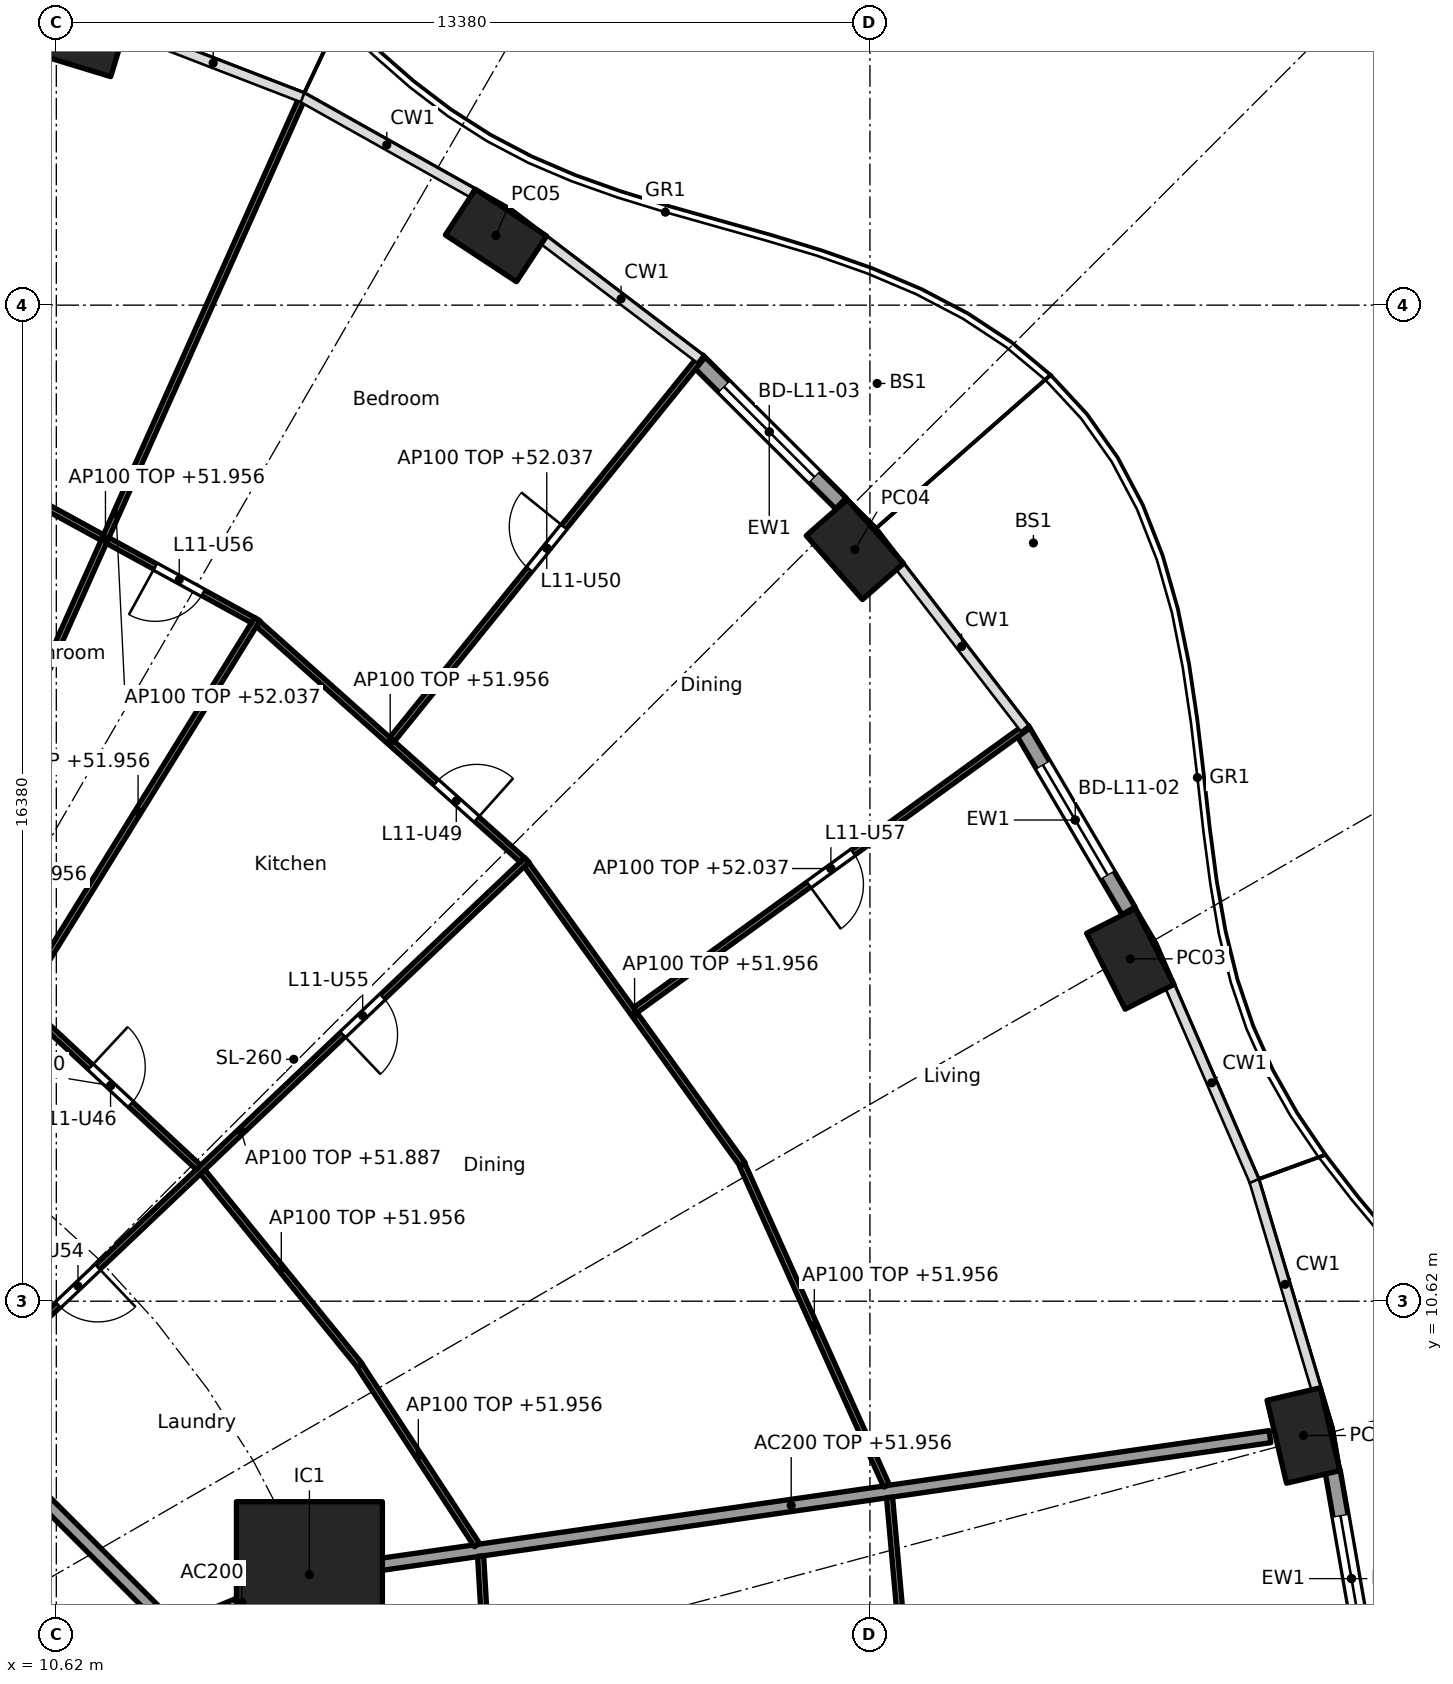
"""IFC4 building model, lengths in metres.
Left out: names, types, materials, properties, quantities, classifications, styles, units other than length and angle.
Written with IfcOpenShell. Run it as: python <this file> out.ifc"""

import sys

from ifc_helpers import new_model, si_unit, direction, frame, frame_2d, origin, origin_2d, place, context, subcontext, project, spatial, rectangle, hollow_rectangle, extrude, element, fill, save


model = new_model("IFC4")
c1 = context("Model", 3, precision=1e-05, world=origin(), true_north=direction((0.0, 1.0)))
c2 = subcontext(c1, "Body", "Model", "MODEL_VIEW")
j1 = project(units=[si_unit("LENGTHUNIT", "METRE"), si_unit("PLANEANGLEUNIT", "RADIAN")], contexts=[c1])
p1 = place(None, origin())
s1 = spatial("IfcSite", under=j1, at=p1, CompositionType="ELEMENT")
p2 = place(p1, origin())
s2 = spatial("IfcBuilding", under=s1, at=p2, CompositionType="ELEMENT")
p3 = place(p2, frame((0.0, 0.0, 49.2)))
s3 = spatial("IfcBuildingStorey", under=s2, at=p3, CompositionType="ELEMENT", Elevation=49.2)
for number, where, z_axis, x_axis in (
    (1, (31.129, 8.412, 0.0), (0.0, 0.0, 1.0), (-0.229, 0.973, 0.0)),
    (2, (28.282, 16.25, 0.0), (0.0, 0.0, 1.0), (-0.452, 0.892, 0.0)),
    (3, (23.752, 22.981, 0.0), (0.0, 0.0, 1.0), (-0.66, 0.751, 0.0)),
    (4, (17.85, 28.146, 0.0), (0.0, 0.0, 1.0), (-0.836, 0.549, 0.0)),
    (5, (10.976, 31.393, 0.0), (0.0, 0.0, 1.0), (-0.957, 0.292, 0.0)),
):
    element("IfcColumn", number, at=place(p3, frame(where, z_axis=z_axis, x_axis=x_axis)), inside=s3, PredefinedType="COLUMN", context=c2, shape_type="SweptSolid", body=[
        extrude(hollow_rectangle(XDim=1.4, YDim=0.9, WallThickness=0.05, at=origin_2d()), origin(), (0.0, 0.0, 1.0), 3.7),
    ])
p4 = place(p3, frame((14.782, 6.123, 0.0), z_axis=(0.0, 0.0, 1.0), x_axis=(1.0, 0.0, 0.0)))
e6 = element("IfcColumn", 6, at=p4, inside=s3, PredefinedType="COLUMN", context=c2, shape_type="SweptSolid", body=[
    extrude(rectangle(XDim=2.4, YDim=2.4, at=origin_2d()), origin(), (0.0, 0.0, 1.0), 3.7),
])
p5 = place(p3, frame((31.609, 7.83, 0.0), z_axis=(0.0, 0.0, 1.0), x_axis=(0.172217377323, -0.98505897029, 0.0)))
e7 = element("IfcWall", 7, at=p5, inside=s3, PredefinedType="SOLIDWALL", context=c2, shape_type="SweptSolid", body=[
    extrude(rectangle(XDim=3.598, YDim=0.25, at=frame_2d((1.799, 0.0))), origin(), (0.0, 0.0, 1.0), 3.44),
])
p6 = place(p5, frame((0.749, 0.0, 0.0)))
e8 = element("IfcOpeningElement", 8, at=p6, cuts=e7, PredefinedType="OPENING", context=c2, shape_type="SweptSolid", body=[
    extrude(rectangle(XDim=2.1, YDim=2.4, at=frame_2d((1.05, 1.2))), frame((0.0, 0.135, 0.0), z_axis=(0.0, -1.0, 0.0), x_axis=(1.0, 0.0, 0.0)), (0.0, 0.0, 1.0), 0.27),
])
p7 = place(p3, frame((26.5, 20.026, 0.0), z_axis=(0.0, 0.0, 1.0), x_axis=(0.506311160839, -0.862350861546, 0.0)))
e9 = element("IfcWall", 9, at=p7, inside=s3, PredefinedType="SOLIDWALL", context=c2, shape_type="SweptSolid", body=[
    extrude(rectangle(XDim=3.462, YDim=0.25, at=frame_2d((1.731, 0.0))), origin(), (0.0, 0.0, 1.0), 3.44),
])
p8 = place(p7, frame((0.681, 0.0, 0.0)))
e10 = element("IfcOpeningElement", 10, at=p8, cuts=e9, PredefinedType="OPENING", context=c2, shape_type="SweptSolid", body=[
    extrude(rectangle(XDim=2.1, YDim=2.4, at=frame_2d((1.05, 1.2))), frame((0.0, 0.135, 0.0), z_axis=(0.0, -1.0, 0.0), x_axis=(1.0, 0.0, 0.0)), (0.0, 0.0, 1.0), 0.27),
])
p9 = place(p3, frame((21.166, 26.092, 0.0), z_axis=(0.0, 0.0, 1.0), x_axis=(0.707803094595, -0.706409781417, 0.0)))
e11 = element("IfcWall", 11, at=p9, inside=s3, PredefinedType="SOLIDWALL", context=c2, shape_type="SweptSolid", body=[
    extrude(rectangle(XDim=3.329, YDim=0.25, at=frame_2d((1.665, 0.0))), origin(), (0.0, 0.0, 1.0), 3.44),
])
p10 = place(p9, frame((0.615, 0.0, 0.0)))
e12 = element("IfcOpeningElement", 12, at=p10, cuts=e11, PredefinedType="OPENING", context=c2, shape_type="SweptSolid", body=[
    extrude(rectangle(XDim=2.1, YDim=2.4, at=frame_2d((1.05, 1.2))), frame((0.0, 0.135, 0.0), z_axis=(0.0, -1.0, 0.0), x_axis=(1.0, 0.0, 0.0)), (0.0, 0.0, 1.0), 0.27),
])
p11 = place(p3, frame((12.657, 5.243, 0.0), z_axis=(0.0, 0.0, 1.0), x_axis=(0.923853160736, 0.382747093259, 0.0)))
e13 = element("IfcWall", 13, at=p11, inside=s3, PredefinedType="PARTITIONING", context=c2, shape_type="SweptSolid", body=[
    extrude(rectangle(XDim=2.2, YDim=0.2, at=frame_2d((1.1, 0.0))), origin(), (0.0, 0.0, 1.0), 3.44),
])
p12 = place(p3, frame((14.832, 6.13, 0.0), z_axis=(0.0, 0.0, 1.0), x_axis=(0.989836541293, 0.142209779978, 0.0)))
e14 = element("IfcWall", 14, at=p12, inside=s3, PredefinedType="PARTITIONING", context=c2, shape_type="SweptSolid", body=[
    extrude(rectangle(XDim=15.909, YDim=0.2, at=frame_2d((7.955, 0.0))), origin(), (0.0, 0.0, 1.0), 2.756),
])
p13 = place(p3, frame((12.635, 5.134, 0.0), z_axis=(0.0, 0.0, 1.0), x_axis=(-0.707106781187, 0.707106781187, 0.0)))
e15 = element("IfcWall", 15, at=p13, inside=s3, PredefinedType="PARTITIONING", context=c2, shape_type="SweptSolid", body=[
    extrude(rectangle(XDim=10.609, YDim=0.2, at=frame_2d((5.305, 0.0))), origin(), (0.0, 0.0, 1.0), 3.44),
])
p14 = place(p3, frame((17.971, 0.05, 0.0), z_axis=(0.0, 0.0, 1.0), x_axis=(-0.058513659907, 0.998286607946, 0.0)))
e16 = element("IfcWall", 16, at=p14, inside=s3, PredefinedType="PARTITIONING", context=c2, shape_type="SweptSolid", body=[
    extrude(rectangle(XDim=6.388, YDim=0.1, at=frame_2d((3.194, 0.0))), origin(), (0.0, 0.0, 1.0), 2.756),
])
p15 = place(p3, frame((24.982, 0.05, 0.0), z_axis=(0.0, 0.0, 1.0), x_axis=(-0.08944290521, 0.995991951126, 0.0)))
e17 = element("IfcWall", 17, at=p15, inside=s3, PredefinedType="PARTITIONING", context=c2, shape_type="SweptSolid", body=[
    extrude(rectangle(XDim=7.373, YDim=0.1, at=frame_2d((3.686, 0.0))), origin(), (0.0, 0.0, 1.0), 2.756),
])
p16 = place(p3, frame((17.537, 6.61, 0.0), z_axis=(0.0, 0.0, 1.0), x_axis=(-0.547637987196, 0.836715384692, 0.0)))
e18 = element("IfcWall", 18, at=p16, inside=s3, PredefinedType="PARTITIONING", context=c2, shape_type="SweptSolid", body=[
    extrude(rectangle(XDim=3.52, YDim=0.1, at=frame_2d((1.76, 0.0))), origin(), (0.0, 0.0, 1.0), 2.756),
])
p17 = place(p3, frame((24.273, 7.584, 0.0), z_axis=(0.0, 0.0, 1.0), x_axis=(-0.410201529109, 0.911994904326, 0.0)))
e19 = element("IfcWall", 19, at=p17, inside=s3, PredefinedType="PARTITIONING", context=c2, shape_type="SweptSolid", body=[
    extrude(rectangle(XDim=5.787, YDim=0.1, at=frame_2d((2.894, 0.0))), origin(), (0.0, 0.0, 1.0), 2.756),
])
p18 = place(p3, frame((15.614, 9.559, 0.0), z_axis=(0.0, 0.0, 1.0), x_axis=(-0.63012473344, 0.776493928056, 0.0)))
e20 = element("IfcWall", 20, at=p18, inside=s3, PredefinedType="PARTITIONING", context=c2, shape_type="SweptSolid", body=[
    extrude(rectangle(XDim=4.106, YDim=0.1, at=frame_2d((2.053, 0.0))), origin(), (0.0, 0.0, 1.0), 2.756),
])
p19 = place(p3, frame((21.908, 12.866, 0.0), z_axis=(0.0, 0.0, 1.0), x_axis=(-0.584558392935, 0.811351640936, 0.0)))
e21 = element("IfcWall", 21, at=p19, inside=s3, PredefinedType="PARTITIONING", context=c2, shape_type="SweptSolid", body=[
    extrude(rectangle(XDim=6.084, YDim=0.1, at=frame_2d((3.042, 0.0))), origin(), (0.0, 0.0, 1.0), 2.756),
])
p20 = place(p3, frame((20.141, 15.405, 0.0), z_axis=(0.0, 0.0, 1.0), x_axis=(0.809834895779, 0.58665785734, 0.0)))
e22 = element("IfcWall", 22, at=p20, inside=s3, PredefinedType="PARTITIONING", context=c2, shape_type="SweptSolid", body=[
    extrude(rectangle(XDim=7.945, YDim=0.1, at=frame_2d((3.973, 0.0))), origin(), (0.0, 0.0, 1.0), 2.837),
])
p21 = place(p20, frame((3.522, 0.0, 0.0)))
e23 = element("IfcOpeningElement", 23, at=p21, cuts=e22, PredefinedType="OPENING", context=c2, shape_type="SweptSolid", body=[
    extrude(rectangle(XDim=0.9, YDim=2.1, at=frame_2d((0.45, 1.05))), frame((0.0, 0.06, 0.0), z_axis=(0.0, -1.0, 0.0), x_axis=(1.0, 0.0, 0.0)), (0.0, 0.0, 1.0), 0.12),
])
p22 = place(p3, frame((8.957, 8.953, 0.0), z_axis=(0.0, 0.0, 1.0), x_axis=(0.725250022034, 0.688485588476, 0.0)))
e24 = element("IfcWall", 24, at=p22, inside=s3, PredefinedType="PARTITIONING", context=c2, shape_type="SweptSolid", body=[
    extrude(rectangle(XDim=12.963, YDim=0.1, at=frame_2d((6.481, 0.0))), origin(), (0.0, 0.0, 1.0), 2.687),
])
p23 = place(p22, frame((2.333, 0.0, 0.0)))
e25 = element("IfcOpeningElement", 25, at=p23, cuts=e24, PredefinedType="OPENING", context=c2, shape_type="SweptSolid", body=[
    extrude(rectangle(XDim=0.9, YDim=2.1, at=frame_2d((0.45, 1.05))), frame((0.0, 0.06, 0.0), z_axis=(0.0, -1.0, 0.0), x_axis=(1.0, 0.0, 0.0)), (0.0, 0.0, 1.0), 0.12),
])
p24 = place(p22, frame((8.79, 0.0, 0.0)))
e26 = element("IfcOpeningElement", 26, at=p24, cuts=e24, PredefinedType="OPENING", context=c2, shape_type="SweptSolid", body=[
    extrude(rectangle(XDim=0.9, YDim=2.1, at=frame_2d((0.45, 1.05))), frame((0.0, 0.06, 0.0), z_axis=(0.0, -1.0, 0.0), x_axis=(1.0, 0.0, 0.0)), (0.0, 0.0, 1.0), 0.12),
])
p25 = place(p3, frame((12.958, 12.82, 0.0), z_axis=(0.0, 0.0, 1.0), x_axis=(-0.732022571638, 0.681280378855, 0.0)))
e27 = element("IfcWall", 27, at=p25, inside=s3, PredefinedType="PARTITIONING", context=c2, shape_type="SweptSolid", body=[
    extrude(rectangle(XDim=3.95, YDim=0.1, at=frame_2d((1.975, 0.0))), origin(), (0.0, 0.0, 1.0), 3.44),
])
p26 = place(p25, frame((1.525, 0.0, 0.0)))
e28 = element("IfcOpeningElement", 28, at=p26, cuts=e27, PredefinedType="OPENING", context=c2, shape_type="SweptSolid", body=[
    extrude(rectangle(XDim=0.9, YDim=2.1, at=frame_2d((0.45, 1.05))), frame((0.0, 0.06, 0.0), z_axis=(0.0, -1.0, 0.0), x_axis=(1.0, 0.0, 0.0)), (0.0, 0.0, 1.0), 0.12),
])
p27 = place(p3, frame((18.285, 17.877, 0.0), z_axis=(0.0, 0.0, 1.0), x_axis=(-0.745806142791, 0.666163041136, 0.0)))
e29 = element("IfcWall", 29, at=p27, inside=s3, PredefinedType="PARTITIONING", context=c2, shape_type="SweptSolid", body=[
    extrude(rectangle(XDim=5.831, YDim=0.1, at=frame_2d((2.915, 0.0))), origin(), (0.0, 0.0, 1.0), 2.756),
])
p28 = place(p27, frame((1.008, 0.0, 0.0)))
e30 = element("IfcOpeningElement", 30, at=p28, cuts=e29, PredefinedType="OPENING", context=c2, shape_type="SweptSolid", body=[
    extrude(rectangle(XDim=0.9, YDim=2.1, at=frame_2d((0.45, 1.05))), frame((0.0, 0.06, 0.0), z_axis=(0.0, -1.0, 0.0), x_axis=(1.0, 0.0, 0.0)), (0.0, 0.0, 1.0), 0.12),
])
p29 = place(p3, frame((16.142, 19.858, 0.0), z_axis=(0.0, 0.0, 1.0), x_axis=(0.628738066508, 0.777617157555, 0.0)))
e31 = element("IfcWall", 31, at=p29, inside=s3, PredefinedType="PARTITIONING", context=c2, shape_type="SweptSolid", body=[
    extrude(rectangle(XDim=8.091, YDim=0.1, at=frame_2d((4.045, 0.0))), origin(), (0.0, 0.0, 1.0), 2.837),
])
p30 = place(p29, frame((3.595, 0.0, 0.0)))
e32 = element("IfcOpeningElement", 32, at=p30, cuts=e31, PredefinedType="OPENING", context=c2, shape_type="SweptSolid", body=[
    extrude(rectangle(XDim=0.9, YDim=2.1, at=frame_2d((0.45, 1.05))), frame((0.0, 0.06, 0.0), z_axis=(0.0, -1.0, 0.0), x_axis=(1.0, 0.0, 0.0)), (0.0, 0.0, 1.0), 0.12),
])
p31 = place(p3, frame((10.003, 15.503, 0.0), z_axis=(0.0, 0.0, 1.0), x_axis=(0.52645953022, 0.850200189979, 0.0)))
e33 = element("IfcWall", 33, at=p31, inside=s3, PredefinedType="PARTITIONING", context=c2, shape_type="SweptSolid", body=[
    extrude(rectangle(XDim=7.45, YDim=0.1, at=frame_2d((3.725, 0.0))), origin(), (0.0, 0.0, 1.0), 2.756),
])
p32 = place(p3, frame((13.855, 21.818, 0.0), z_axis=(0.0, 0.0, 1.0), x_axis=(-0.876794415294, 0.480865421203, 0.0)))
e34 = element("IfcWall", 34, at=p32, inside=s3, PredefinedType="PARTITIONING", context=c2, shape_type="SweptSolid", body=[
    extrude(rectangle(XDim=5.536, YDim=0.1, at=frame_2d((2.768, 0.0))), origin(), (0.0, 0.0, 1.0), 2.756),
])
p33 = place(p32, frame((0.934, 0.0, 0.0)))
e35 = element("IfcOpeningElement", 35, at=p33, cuts=e34, PredefinedType="OPENING", context=c2, shape_type="SweptSolid", body=[
    extrude(rectangle(XDim=0.9, YDim=2.1, at=frame_2d((0.45, 1.05))), frame((0.0, 0.06, 0.0), z_axis=(0.0, -1.0, 0.0), x_axis=(1.0, 0.0, 0.0)), (0.0, 0.0, 1.0), 0.12),
])
p34 = place(p3, frame((8.524, 16.676, 0.0), z_axis=(0.0, 0.0, 1.0), x_axis=(0.408065177262, 0.912952797852, 0.0)))
e36 = element("IfcWall", 36, at=p34, inside=s3, PredefinedType="PARTITIONING", context=c2, shape_type="SweptSolid", body=[
    extrude(rectangle(XDim=15.089, YDim=0.1, at=frame_2d((7.544, 0.0))), origin(), (0.0, 0.0, 1.0), 2.837),
])
p35 = place(p6, origin())
e37 = element("IfcDoor", 37, at=p35, inside=s3, OperationType="SLIDING_TO_LEFT", PredefinedType="DOOR", context=c2, shape_type="SweptSolid", body=[
    extrude(rectangle(XDim=2.1, YDim=2.4, at=frame_2d((1.05, 1.2))), frame((0.0, 0.025, 0.0), z_axis=(0.0, -1.0, 0.0), x_axis=(1.0, 0.0, 0.0)), (0.0, 0.0, 1.0), 0.05),
])
fill(e8, e37)
p36 = place(p8, origin())
e38 = element("IfcDoor", 38, at=p36, inside=s3, OperationType="SLIDING_TO_LEFT", PredefinedType="DOOR", context=c2, shape_type="SweptSolid", body=[
    extrude(rectangle(XDim=2.1, YDim=2.4, at=frame_2d((1.05, 1.2))), frame((0.0, 0.025, 0.0), z_axis=(0.0, -1.0, 0.0), x_axis=(1.0, 0.0, 0.0)), (0.0, 0.0, 1.0), 0.05),
])
fill(e10, e38)
p37 = place(p10, origin())
e39 = element("IfcDoor", 39, at=p37, inside=s3, OperationType="SLIDING_TO_LEFT", PredefinedType="DOOR", context=c2, shape_type="SweptSolid", body=[
    extrude(rectangle(XDim=2.1, YDim=2.4, at=frame_2d((1.05, 1.2))), frame((0.0, 0.025, 0.0), z_axis=(0.0, -1.0, 0.0), x_axis=(1.0, 0.0, 0.0)), (0.0, 0.0, 1.0), 0.05),
])
fill(e12, e39)
p38 = place(p26, frame((0.9, 0.0, 0.0), x_axis=(-1.0, 0.0, 0.0)))
e40 = element("IfcDoor", 40, at=p38, inside=s3, OperationType="SINGLE_SWING_LEFT", PredefinedType="DOOR", context=c2, shape_type="SweptSolid", body=[
    extrude(rectangle(XDim=0.9, YDim=2.1, at=frame_2d((0.45, 1.05))), frame((0.0, 0.025, 0.0), z_axis=(0.0, -1.0, 0.0), x_axis=(1.0, 0.0, 0.0)), (0.0, 0.0, 1.0), 0.05),
])
fill(e28, e40)
p39 = place(p28, frame((0.9, 0.0, 0.0), x_axis=(-1.0, 0.0, 0.0)))
e41 = element("IfcDoor", 41, at=p39, inside=s3, OperationType="SINGLE_SWING_RIGHT", PredefinedType="DOOR", context=c2, shape_type="SweptSolid", body=[
    extrude(rectangle(XDim=0.9, YDim=2.1, at=frame_2d((0.45, 1.05))), frame((0.0, 0.025, 0.0), z_axis=(0.0, -1.0, 0.0), x_axis=(1.0, 0.0, 0.0)), (0.0, 0.0, 1.0), 0.05),
])
fill(e30, e41)
p40 = place(p30, origin())
e42 = element("IfcDoor", 42, at=p40, inside=s3, OperationType="SINGLE_SWING_RIGHT", PredefinedType="DOOR", context=c2, shape_type="SweptSolid", body=[
    extrude(rectangle(XDim=0.9, YDim=2.1, at=frame_2d((0.45, 1.05))), frame((0.0, 0.025, 0.0), z_axis=(0.0, -1.0, 0.0), x_axis=(1.0, 0.0, 0.0)), (0.0, 0.0, 1.0), 0.05),
])
fill(e32, e42)
p41 = place(p23, frame((0.9, 0.0, 0.0), x_axis=(-1.0, 0.0, 0.0)))
e43 = element("IfcDoor", 43, at=p41, inside=s3, OperationType="SINGLE_SWING_LEFT", PredefinedType="DOOR", context=c2, shape_type="SweptSolid", body=[
    extrude(rectangle(XDim=0.9, YDim=2.1, at=frame_2d((0.45, 1.05))), frame((0.0, 0.025, 0.0), z_axis=(0.0, -1.0, 0.0), x_axis=(1.0, 0.0, 0.0)), (0.0, 0.0, 1.0), 0.05),
])
fill(e25, e43)
p42 = place(p24, frame((0.9, 0.0, 0.0), x_axis=(-1.0, 0.0, 0.0)))
e44 = element("IfcDoor", 44, at=p42, inside=s3, OperationType="SINGLE_SWING_RIGHT", PredefinedType="DOOR", context=c2, shape_type="SweptSolid", body=[
    extrude(rectangle(XDim=0.9, YDim=2.1, at=frame_2d((0.45, 1.05))), frame((0.0, 0.025, 0.0), z_axis=(0.0, -1.0, 0.0), x_axis=(1.0, 0.0, 0.0)), (0.0, 0.0, 1.0), 0.05),
])
fill(e26, e44)
p43 = place(p33, origin())
e45 = element("IfcDoor", 45, at=p43, inside=s3, OperationType="SINGLE_SWING_RIGHT", PredefinedType="DOOR", context=c2, shape_type="SweptSolid", body=[
    extrude(rectangle(XDim=0.9, YDim=2.1, at=frame_2d((0.45, 1.05))), frame((0.0, 0.025, 0.0), z_axis=(0.0, -1.0, 0.0), x_axis=(1.0, 0.0, 0.0)), (0.0, 0.0, 1.0), 0.05),
])
fill(e35, e45)
p44 = place(p21, frame((0.9, 0.0, 0.0), x_axis=(-1.0, 0.0, 0.0)))
e46 = element("IfcDoor", 46, at=p44, inside=s3, OperationType="SINGLE_SWING_RIGHT", PredefinedType="DOOR", context=c2, shape_type="SweptSolid", body=[
    extrude(rectangle(XDim=0.9, YDim=2.1, at=frame_2d((0.45, 1.05))), frame((0.0, 0.025, 0.0), z_axis=(0.0, -1.0, 0.0), x_axis=(1.0, 0.0, 0.0)), (0.0, 0.0, 1.0), 0.05),
])
fill(e23, e46)
save(model, sys.argv[1])
